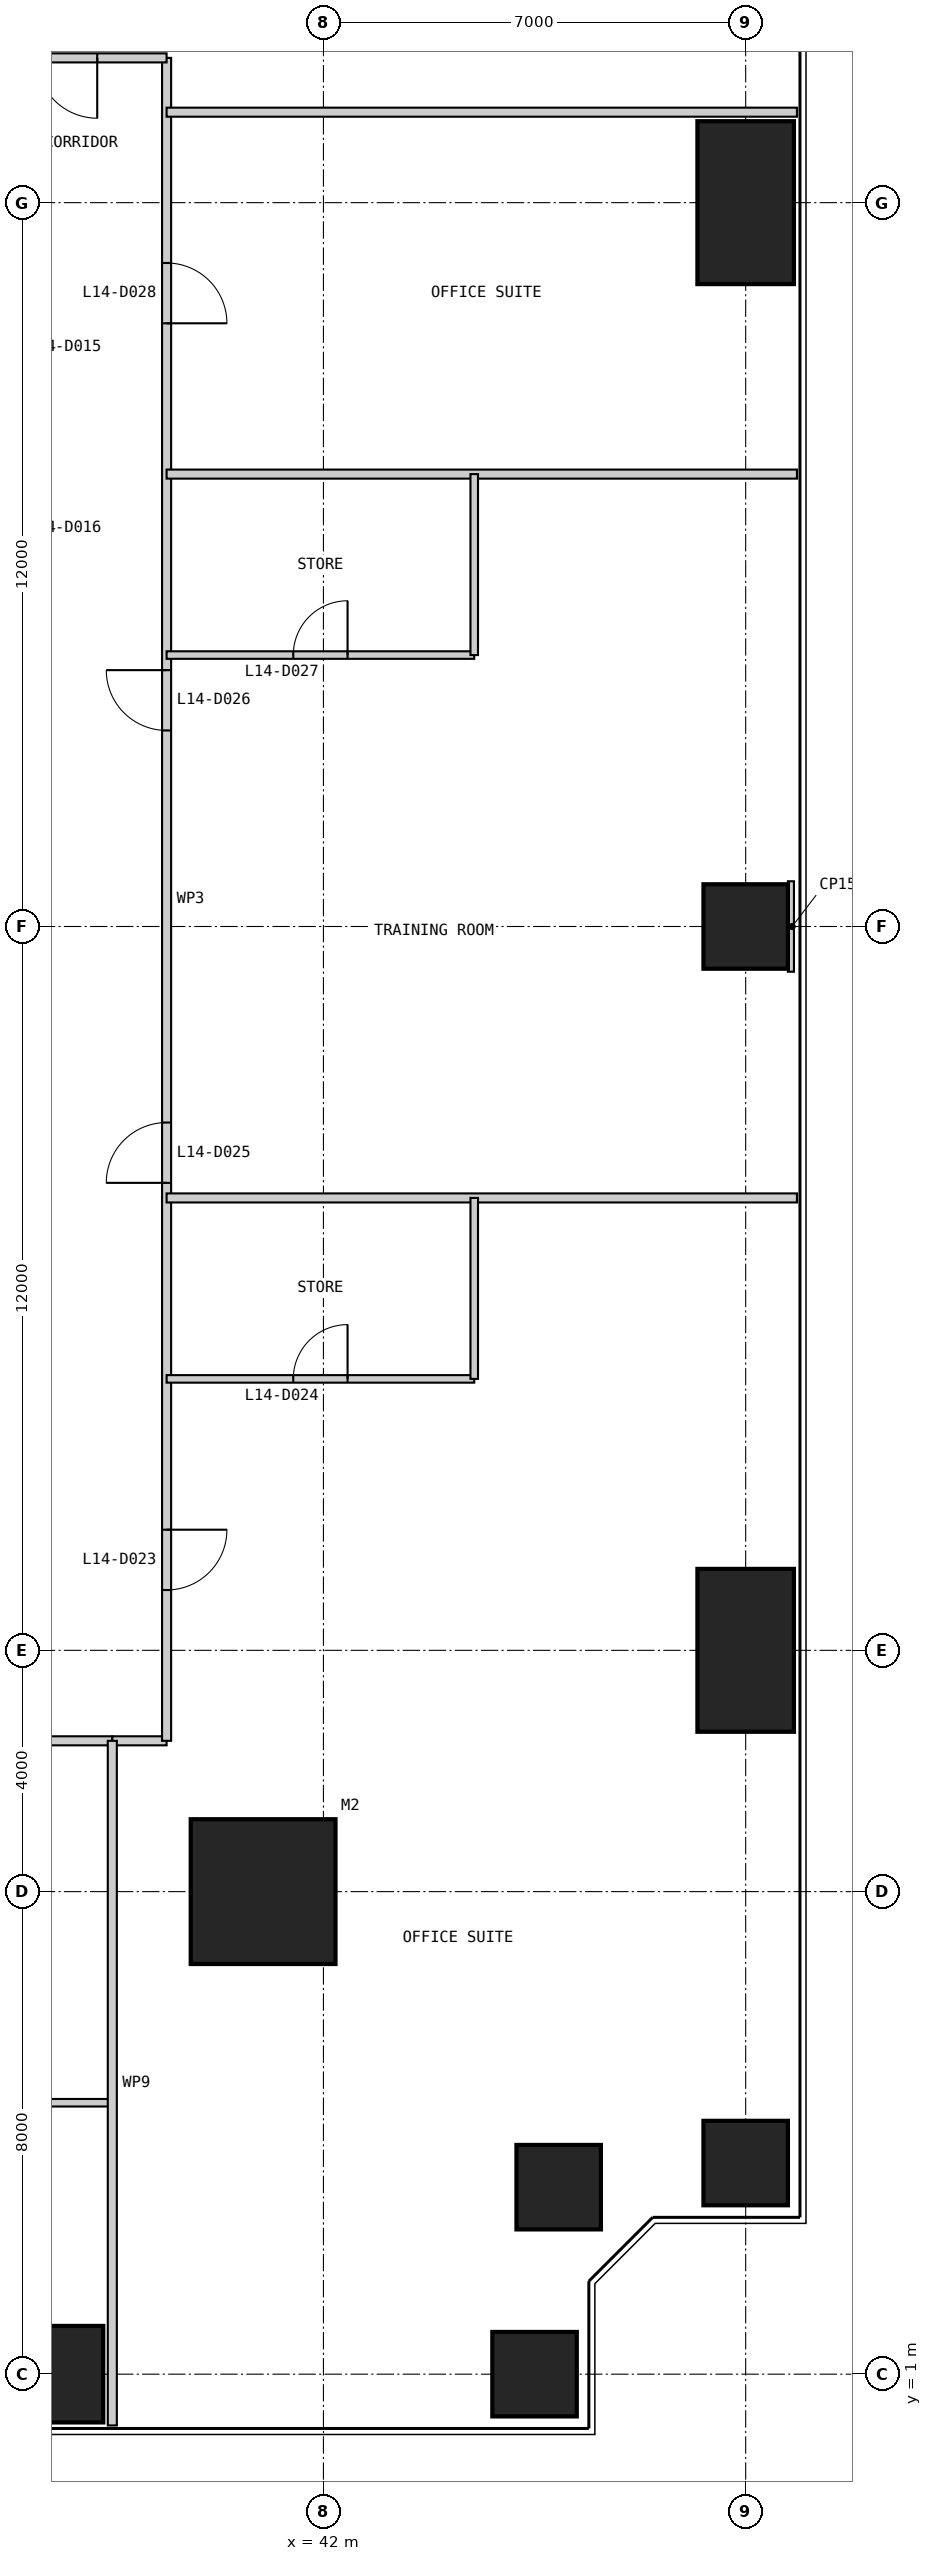
"""IFC4 building model, lengths in metres.
Left out: names, types, materials, properties, quantities, classifications, styles, units other than length and angle.
Written with IfcOpenShell. Run it as: python <this file> out.ifc"""

import sys

from ifc_helpers import new_model, si_unit, direction, frame, frame_2d, origin, origin_2d, place, context, subcontext, project, spatial, rectangle, extrude, element, fill, save


model = new_model("IFC4")
c1 = context("Model", 3, precision=1e-05, world=origin(), true_north=direction((0.0, 1.0)))
c2 = subcontext(c1, "Body", "Model", "MODEL_VIEW")
j1 = project(units=[si_unit("LENGTHUNIT", "METRE"), si_unit("PLANEANGLEUNIT", "RADIAN")], contexts=[c1])
p1 = place(None, origin())
s1 = spatial("IfcSite", under=j1, at=p1, CompositionType="ELEMENT")
p2 = place(p1, origin())
s2 = spatial("IfcBuilding", under=s1, at=p2, CompositionType="ELEMENT")
p3 = place(p2, frame((0.0, 0.0, 63.0)))
s3 = spatial("IfcBuildingStorey", under=s2, at=p3, CompositionType="ELEMENT", Elevation=63.0)
p4 = place(p3, frame((41.0, 9.0, 0.0), z_axis=(0.0, 0.0, 1.0), x_axis=(1.0, 0.0, 0.0)))
e1 = element("IfcColumn", 1, at=p4, inside=s3, PredefinedType="COLUMN", context=c2, shape_type="SweptSolid", body=[
    extrude(rectangle(XDim=2.4, YDim=2.4, at=origin_2d()), origin(), (0.0, 0.0, 1.0), 4.0),
])
p5 = place(p3, frame((37.0, 1.0, 0.0), z_axis=(0.0, 0.0, 1.0), x_axis=(1.0, 0.0, 0.0)))
e2 = element("IfcColumn", 2, at=p5, inside=s3, PredefinedType="COLUMN", context=c2, shape_type="SweptSolid", body=[
    extrude(rectangle(XDim=2.7, YDim=1.6, at=origin_2d()), origin(), (0.0, 0.0, 1.0), 4.0),
])
for number, where, z_axis, x_axis in (
    (3, (45.5, 1.0, 0.0), (0.0, 0.0, 1.0), (1.0, 0.0, 0.0)),
    (4, (45.9, 4.1, 0.0), (0.0, 0.0, 1.0), (1.0, 0.0, 0.0)),
    (5, (49.0, 4.5, 0.0), (0.0, 0.0, 1.0), (1.0, 0.0, 0.0)),
):
    element("IfcColumn", number, at=place(p3, frame(where, z_axis=z_axis, x_axis=x_axis)), inside=s3, PredefinedType="COLUMN", context=c2, shape_type="SweptSolid", body=[
        extrude(rectangle(XDim=1.4, YDim=1.4, at=origin_2d()), origin(), (0.0, 0.0, 1.0), 4.0),
    ])
p6 = place(p3, frame((49.0, 13.0, 0.0), z_axis=(0.0, 0.0, 1.0), x_axis=(1.0, 0.0, 0.0)))
e6 = element("IfcColumn", 6, at=p6, inside=s3, PredefinedType="COLUMN", context=c2, shape_type="SweptSolid", body=[
    extrude(rectangle(XDim=1.6, YDim=2.7, at=origin_2d()), origin(), (0.0, 0.0, 1.0), 4.0),
])
p7 = place(p3, frame((49.0, 25.0, 0.0), z_axis=(0.0, 0.0, 1.0), x_axis=(1.0, 0.0, 0.0)))
e7 = element("IfcColumn", 7, at=p7, inside=s3, PredefinedType="COLUMN", context=c2, shape_type="SweptSolid", body=[
    extrude(rectangle(XDim=1.4, YDim=1.4, at=origin_2d()), origin(), (0.0, 0.0, 1.0), 4.0),
])
p8 = place(p3, frame((49.0, 37.0, 0.0), z_axis=(0.0, 0.0, 1.0), x_axis=(1.0, 0.0, 0.0)))
e8 = element("IfcColumn", 8, at=p8, inside=s3, PredefinedType="COLUMN", context=c2, shape_type="SweptSolid", body=[
    extrude(rectangle(XDim=1.6, YDim=2.7, at=origin_2d()), origin(), (0.0, 0.0, 1.0), 4.0),
])
p9 = place(p3, frame((11.5, 11.5, 0.0), z_axis=(0.0, 0.0, 1.0), x_axis=(1.0, 0.0, 0.0)))
e9 = element("IfcWall", 9, at=p9, inside=s3, PredefinedType="PARTITIONING", context=c2, shape_type="SweptSolid", body=[
    extrude(rectangle(XDim=27.0, YDim=0.15, at=frame_2d((13.5, 0.0))), origin(), (0.0, 0.0, 1.0), 3.85),
])
p10 = place(p9, frame((1.0, 0.0, 0.0)))
e10 = element("IfcOpeningElement", 10, at=p10, cuts=e9, PredefinedType="OPENING", context=c2, shape_type="SweptSolid", body=[
    extrude(rectangle(XDim=1.0, YDim=2.2, at=frame_2d((0.5, 1.1))), frame((0.0, 0.085, 0.0), z_axis=(0.0, -1.0, 0.0), x_axis=(1.0, 0.0, 0.0)), (0.0, 0.0, 1.0), 0.17),
])
p11 = place(p9, frame((5.5, 0.0, 0.0)))
e11 = element("IfcOpeningElement", 11, at=p11, cuts=e9, PredefinedType="OPENING", context=c2, shape_type="SweptSolid", body=[
    extrude(rectangle(XDim=1.0, YDim=2.2, at=frame_2d((0.5, 1.1))), frame((0.0, 0.085, 0.0), z_axis=(0.0, -1.0, 0.0), x_axis=(1.0, 0.0, 0.0)), (0.0, 0.0, 1.0), 0.17),
])
p12 = place(p9, frame((11.5, 0.0, 0.0)))
e12 = element("IfcOpeningElement", 12, at=p12, cuts=e9, PredefinedType="OPENING", context=c2, shape_type="SweptSolid", body=[
    extrude(rectangle(XDim=1.0, YDim=2.2, at=frame_2d((0.5, 1.1))), frame((0.0, 0.085, 0.0), z_axis=(0.0, -1.0, 0.0), x_axis=(1.0, 0.0, 0.0)), (0.0, 0.0, 1.0), 0.17),
])
p13 = place(p9, frame((19.0, 0.0, 0.0)))
e13 = element("IfcOpeningElement", 13, at=p13, cuts=e9, PredefinedType="OPENING", context=c2, shape_type="SweptSolid", body=[
    extrude(rectangle(XDim=1.0, YDim=2.2, at=frame_2d((0.5, 1.1))), frame((0.0, 0.085, 0.0), z_axis=(0.0, -1.0, 0.0), x_axis=(1.0, 0.0, 0.0)), (0.0, 0.0, 1.0), 0.17),
])
p14 = place(p3, frame((32.5, 5.5, 0.0), z_axis=(0.0, 0.0, 1.0), x_axis=(1.0, 0.0, 0.0)))
e14 = element("IfcWall", 14, at=p14, inside=s3, PredefinedType="PARTITIONING", context=c2, shape_type="SweptSolid", body=[
    extrude(rectangle(XDim=6.0, YDim=0.125, at=frame_2d((3.0, 0.0))), origin(), (0.0, 0.0, 1.0), 3.85),
])
p15 = place(p3, frame((38.5, 11.5, 0.0), z_axis=(0.0, 0.0, 1.0), x_axis=(1.0, 0.0, 0.0)))
e15 = element("IfcWall", 15, at=p15, inside=s3, PredefinedType="PARTITIONING", context=c2, shape_type="SweptSolid", body=[
    extrude(rectangle(XDim=0.9, YDim=0.15, at=frame_2d((0.45, 0.0))), origin(), (0.0, 0.0, 1.0), 3.85),
])
p16 = place(p3, frame((39.4, 11.5, 0.0), z_axis=(0.0, 0.0, 1.0), x_axis=(0.0, 1.0, 0.0)))
e16 = element("IfcWall", 16, at=p16, inside=s3, PredefinedType="PARTITIONING", context=c2, shape_type="SweptSolid", body=[
    extrude(rectangle(XDim=27.9, YDim=0.15, at=frame_2d((13.95, 0.0))), origin(), (0.0, 0.0, 1.0), 3.85),
])
p17 = place(p16, frame((2.5, 0.0, 0.0)))
e17 = element("IfcOpeningElement", 17, at=p17, cuts=e16, PredefinedType="OPENING", context=c2, shape_type="SweptSolid", body=[
    extrude(rectangle(XDim=1.0, YDim=2.2, at=frame_2d((0.5, 1.1))), frame((0.0, 0.085, 0.0), z_axis=(0.0, -1.0, 0.0), x_axis=(1.0, 0.0, 0.0)), (0.0, 0.0, 1.0), 0.17),
])
p18 = place(p16, frame((9.25, 0.0, 0.0)))
e18 = element("IfcOpeningElement", 18, at=p18, cuts=e16, PredefinedType="OPENING", context=c2, shape_type="SweptSolid", body=[
    extrude(rectangle(XDim=1.0, YDim=2.2, at=frame_2d((0.5, 1.1))), frame((0.0, 0.085, 0.0), z_axis=(0.0, -1.0, 0.0), x_axis=(1.0, 0.0, 0.0)), (0.0, 0.0, 1.0), 0.17),
])
p19 = place(p16, frame((16.75, 0.0, 0.0)))
e19 = element("IfcOpeningElement", 19, at=p19, cuts=e16, PredefinedType="OPENING", context=c2, shape_type="SweptSolid", body=[
    extrude(rectangle(XDim=1.0, YDim=2.2, at=frame_2d((0.5, 1.1))), frame((0.0, 0.085, 0.0), z_axis=(0.0, -1.0, 0.0), x_axis=(1.0, 0.0, 0.0)), (0.0, 0.0, 1.0), 0.17),
])
p20 = place(p16, frame((23.5, 0.0, 0.0)))
e20 = element("IfcOpeningElement", 20, at=p20, cuts=e16, PredefinedType="OPENING", context=c2, shape_type="SweptSolid", body=[
    extrude(rectangle(XDim=1.0, YDim=2.2, at=frame_2d((0.5, 1.1))), frame((0.0, 0.085, 0.0), z_axis=(0.0, -1.0, 0.0), x_axis=(1.0, 0.0, 0.0)), (0.0, 0.0, 1.0), 0.17),
])
p21 = place(p3, frame((38.5, 0.15, 0.0), z_axis=(0.0, 0.0, 1.0), x_axis=(0.0, 1.0, 0.0)))
e21 = element("IfcWall", 21, at=p21, inside=s3, PredefinedType="PARTITIONING", context=c2, shape_type="SweptSolid", body=[
    extrude(rectangle(XDim=11.35, YDim=0.15, at=frame_2d((5.675, 0.0))), origin(), (0.0, 0.0, 1.0), 3.85),
])
p22 = place(p3, frame((44.5, 17.5, 0.0), z_axis=(0.0, 0.0, 1.0), x_axis=(-1.0, 0.0, 0.0)))
e22 = element("IfcWall", 22, at=p22, inside=s3, PredefinedType="PARTITIONING", context=c2, shape_type="SweptSolid", body=[
    extrude(rectangle(XDim=5.1, YDim=0.125, at=frame_2d((2.55, 0.0))), origin(), (0.0, 0.0, 1.0), 3.85),
])
p23 = place(p22, frame((2.1, 0.0, 0.0)))
e23 = element("IfcOpeningElement", 23, at=p23, cuts=e22, PredefinedType="OPENING", context=c2, shape_type="SweptSolid", body=[
    extrude(rectangle(XDim=0.9, YDim=2.2, at=frame_2d((0.45, 1.1))), frame((0.0, 0.073, 0.0), z_axis=(0.0, -1.0, 0.0), x_axis=(1.0, 0.0, 0.0)), (0.0, 0.0, 1.0), 0.145),
])
p24 = place(p3, frame((49.85, 20.5, 0.0), z_axis=(0.0, 0.0, 1.0), x_axis=(-1.0, 0.0, 0.0)))
e24 = element("IfcWall", 24, at=p24, inside=s3, PredefinedType="PARTITIONING", context=c2, shape_type="SweptSolid", body=[
    extrude(rectangle(XDim=10.45, YDim=0.15, at=frame_2d((5.225, 0.0))), origin(), (0.0, 0.0, 1.0), 3.85),
])
p25 = place(p3, frame((44.5, 29.5, 0.0), z_axis=(0.0, 0.0, 1.0), x_axis=(-1.0, 0.0, 0.0)))
e25 = element("IfcWall", 25, at=p25, inside=s3, PredefinedType="PARTITIONING", context=c2, shape_type="SweptSolid", body=[
    extrude(rectangle(XDim=5.1, YDim=0.125, at=frame_2d((2.55, 0.0))), origin(), (0.0, 0.0, 1.0), 3.85),
])
p26 = place(p25, frame((2.1, 0.0, 0.0)))
e26 = element("IfcOpeningElement", 26, at=p26, cuts=e25, PredefinedType="OPENING", context=c2, shape_type="SweptSolid", body=[
    extrude(rectangle(XDim=0.9, YDim=2.2, at=frame_2d((0.45, 1.1))), frame((0.0, 0.073, 0.0), z_axis=(0.0, -1.0, 0.0), x_axis=(1.0, 0.0, 0.0)), (0.0, 0.0, 1.0), 0.145),
])
p27 = place(p3, frame((49.85, 32.5, 0.0), z_axis=(0.0, 0.0, 1.0), x_axis=(-1.0, 0.0, 0.0)))
e27 = element("IfcWall", 27, at=p27, inside=s3, PredefinedType="PARTITIONING", context=c2, shape_type="SweptSolid", body=[
    extrude(rectangle(XDim=10.45, YDim=0.15, at=frame_2d((5.225, 0.0))), origin(), (0.0, 0.0, 1.0), 3.85),
])
for number, where, z_axis, x_axis in (
    (28, (44.5, 17.5, 0.0), (0.0, 0.0, 1.0), (0.0, 1.0, 0.0)),
    (29, (44.5, 29.5, 0.0), (0.0, 0.0, 1.0), (0.0, 1.0, 0.0)),
):
    element("IfcWall", number, at=place(p3, frame(where, z_axis=z_axis, x_axis=x_axis)), inside=s3, PredefinedType="PARTITIONING", context=c2, shape_type="SweptSolid", body=[
        extrude(rectangle(XDim=3.0, YDim=0.125, at=frame_2d((1.5, 0.0))), origin(), (0.0, 0.0, 1.0), 3.85),
    ])
p28 = place(p3, frame((39.4, 39.4, 0.0), z_axis=(0.0, 0.0, 1.0), x_axis=(-1.0, 0.0, 0.0)))
e30 = element("IfcWall", 30, at=p28, inside=s3, PredefinedType="PARTITIONING", context=c2, shape_type="SweptSolid", body=[
    extrude(rectangle(XDim=27.9, YDim=0.15, at=frame_2d((13.95, 0.0))), origin(), (0.0, 0.0, 1.0), 3.85),
])
p29 = place(p28, frame((1.15, 0.0, 0.0)))
e31 = element("IfcOpeningElement", 31, at=p29, cuts=e30, PredefinedType="OPENING", context=c2, shape_type="SweptSolid", body=[
    extrude(rectangle(XDim=1.0, YDim=2.2, at=frame_2d((0.5, 1.1))), frame((0.0, 0.085, 0.0), z_axis=(0.0, -1.0, 0.0), x_axis=(1.0, 0.0, 0.0)), (0.0, 0.0, 1.0), 0.17),
])
p30 = place(p28, frame((23.65, 0.0, 0.0)))
e32 = element("IfcOpeningElement", 32, at=p30, cuts=e30, PredefinedType="OPENING", context=c2, shape_type="SweptSolid", body=[
    extrude(rectangle(XDim=1.0, YDim=2.2, at=frame_2d((0.5, 1.1))), frame((0.0, 0.085, 0.0), z_axis=(0.0, -1.0, 0.0), x_axis=(1.0, 0.0, 0.0)), (0.0, 0.0, 1.0), 0.17),
])
p31 = place(p3, frame((49.85, 38.5, 0.0), z_axis=(0.0, 0.0, 1.0), x_axis=(-1.0, 0.0, 0.0)))
e33 = element("IfcWall", 33, at=p31, inside=s3, PredefinedType="PARTITIONING", context=c2, shape_type="SweptSolid", body=[
    extrude(rectangle(XDim=10.45, YDim=0.15, at=frame_2d((5.225, 0.0))), origin(), (0.0, 0.0, 1.0), 3.85),
])
p32 = place(p3, frame((49.8, 25.0, 0.0), z_axis=(0.0, 0.0, 1.0), x_axis=(-1.0, 0.0, 0.0)))
e34 = element("IfcWall", 34, at=p32, inside=s3, PredefinedType="PARTITIONING", context=c2, shape_type="SweptSolid", body=[
    extrude(rectangle(XDim=0.1, YDim=1.5, at=frame_2d((0.05, 0.0))), origin(), (0.0, 0.0, 1.0), 3.85),
])
p33 = place(p17, frame((1.0, 0.0, 0.0), z_axis=(0.0, 0.0, 1.0), x_axis=(-1.0, 0.0, 0.0)))
e35 = element("IfcDoor", 35, at=p33, inside=s3, OperationType="SINGLE_SWING_LEFT", PredefinedType="DOOR", context=c2, shape_type="SweptSolid", body=[
    extrude(rectangle(XDim=1.0, YDim=2.2, at=frame_2d((0.5, 1.1))), frame((0.0, 0.025, 0.0), z_axis=(0.0, -1.0, 0.0), x_axis=(1.0, 0.0, 0.0)), (0.0, 0.0, 1.0), 0.05),
])
fill(e17, e35)
p34 = place(p23, frame((0.9, 0.0, 0.0), z_axis=(0.0, 0.0, 1.0), x_axis=(-1.0, 0.0, 0.0)))
e36 = element("IfcDoor", 36, at=p34, inside=s3, OperationType="SINGLE_SWING_RIGHT", PredefinedType="DOOR", context=c2, shape_type="SweptSolid", body=[
    extrude(rectangle(XDim=0.9, YDim=2.2, at=frame_2d((0.45, 1.1))), frame((0.0, 0.025, 0.0), z_axis=(0.0, -1.0, 0.0), x_axis=(1.0, 0.0, 0.0)), (0.0, 0.0, 1.0), 0.05),
])
fill(e23, e36)
p35 = place(p18, origin())
e37 = element("IfcDoor", 37, at=p35, inside=s3, OperationType="SINGLE_SWING_LEFT", PredefinedType="DOOR", context=c2, shape_type="SweptSolid", body=[
    extrude(rectangle(XDim=1.0, YDim=2.2, at=frame_2d((0.5, 1.1))), frame((0.0, 0.025, 0.0), z_axis=(0.0, -1.0, 0.0), x_axis=(1.0, 0.0, 0.0)), (0.0, 0.0, 1.0), 0.05),
])
fill(e18, e37)
p36 = place(p19, origin())
e38 = element("IfcDoor", 38, at=p36, inside=s3, OperationType="SINGLE_SWING_RIGHT", PredefinedType="DOOR", context=c2, shape_type="SweptSolid", body=[
    extrude(rectangle(XDim=1.0, YDim=2.2, at=frame_2d((0.5, 1.1))), frame((0.0, 0.025, 0.0), z_axis=(0.0, -1.0, 0.0), x_axis=(1.0, 0.0, 0.0)), (0.0, 0.0, 1.0), 0.05),
])
fill(e19, e38)
p37 = place(p26, frame((0.9, 0.0, 0.0), z_axis=(0.0, 0.0, 1.0), x_axis=(-1.0, 0.0, 0.0)))
e39 = element("IfcDoor", 39, at=p37, inside=s3, OperationType="SINGLE_SWING_RIGHT", PredefinedType="DOOR", context=c2, shape_type="SweptSolid", body=[
    extrude(rectangle(XDim=0.9, YDim=2.2, at=frame_2d((0.45, 1.1))), frame((0.0, 0.025, 0.0), z_axis=(0.0, -1.0, 0.0), x_axis=(1.0, 0.0, 0.0)), (0.0, 0.0, 1.0), 0.05),
])
fill(e26, e39)
p38 = place(p20, frame((1.0, 0.0, 0.0), z_axis=(0.0, 0.0, 1.0), x_axis=(-1.0, 0.0, 0.0)))
e40 = element("IfcDoor", 40, at=p38, inside=s3, OperationType="SINGLE_SWING_RIGHT", PredefinedType="DOOR", context=c2, shape_type="SweptSolid", body=[
    extrude(rectangle(XDim=1.0, YDim=2.2, at=frame_2d((0.5, 1.1))), frame((0.0, 0.025, 0.0), z_axis=(0.0, -1.0, 0.0), x_axis=(1.0, 0.0, 0.0)), (0.0, 0.0, 1.0), 0.05),
])
fill(e20, e40)
p39 = place(p29, origin())
e41 = element("IfcDoor", 41, at=p39, inside=s3, OperationType="SINGLE_SWING_LEFT", PredefinedType="DOOR", context=c2, shape_type="SweptSolid", body=[
    extrude(rectangle(XDim=1.0, YDim=2.2, at=frame_2d((0.5, 1.1))), frame((0.0, 0.025, 0.0), z_axis=(0.0, -1.0, 0.0), x_axis=(1.0, 0.0, 0.0)), (0.0, 0.0, 1.0), 0.05),
])
fill(e31, e41)
save(model, sys.argv[1])
